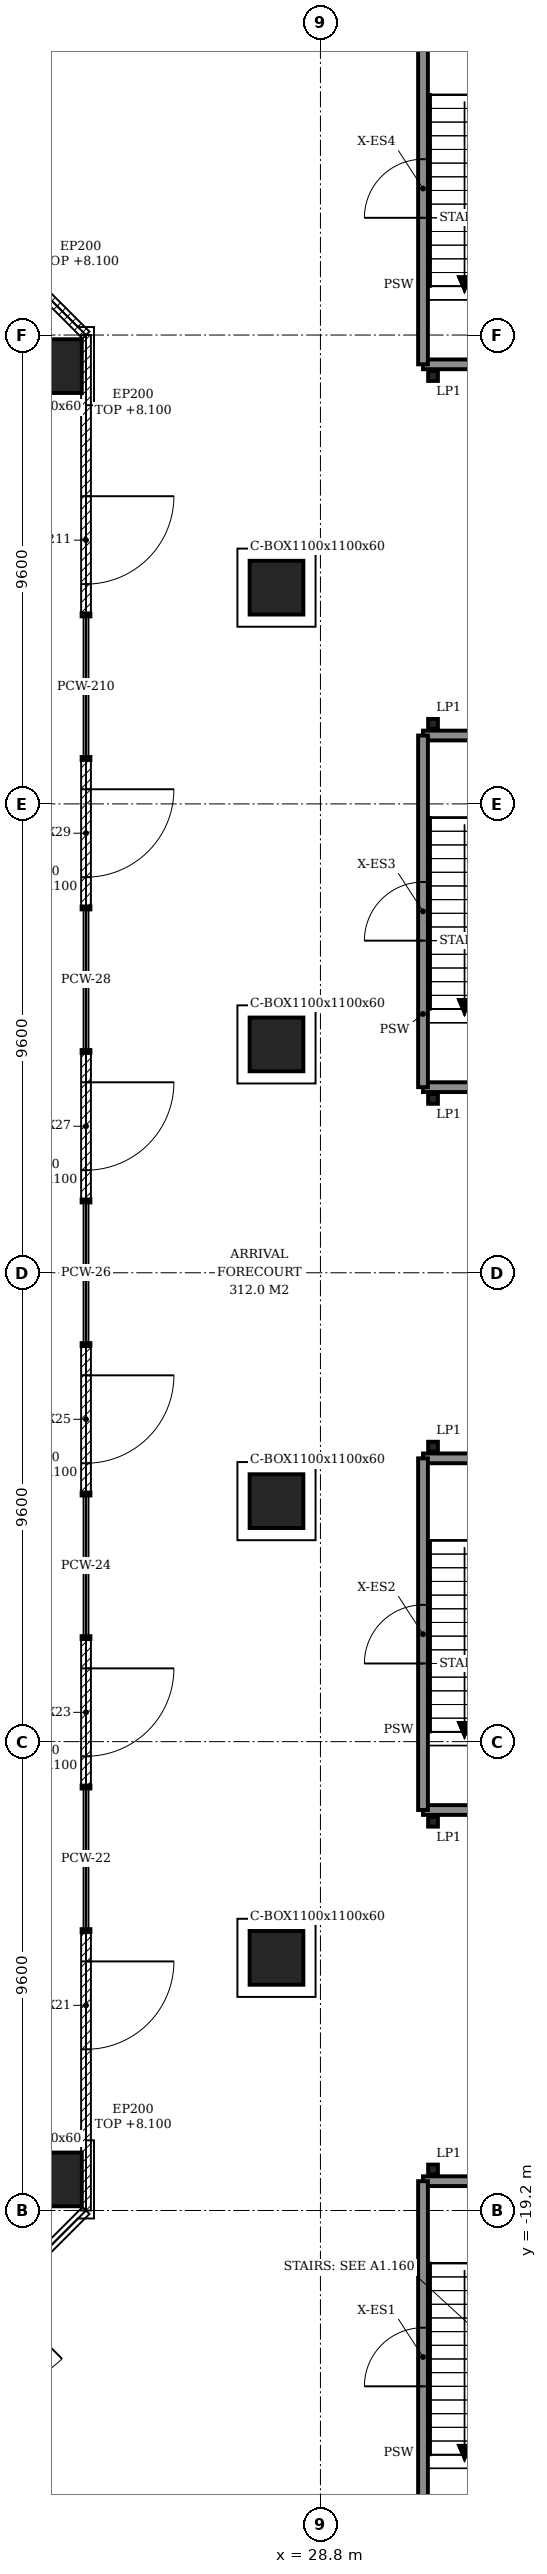
"""IFC4 building model, lengths in metres.
Left out: names, types, materials, properties, quantities, classifications, styles, units other than length and angle.
Written with IfcOpenShell. Run it as: python <this file> out.ifc"""

import sys

from ifc_helpers import new_model, si_unit, direction, frame, frame_2d, origin, origin_2d, place, context, subcontext, project, spatial, rectangle, hollow_rectangle, i_section, extrude, element, fill, save


model = new_model("IFC4")
c1 = context("Model", 3, precision=1e-05, world=origin(), true_north=direction((0.0, 1.0)))
c2 = subcontext(c1, "Body", "Model", "MODEL_VIEW")
j1 = project(units=[si_unit("LENGTHUNIT", "METRE"), si_unit("PLANEANGLEUNIT", "RADIAN")], contexts=[c1])
p1 = place(None, origin())
s1 = spatial("IfcSite", under=j1, at=p1, CompositionType="ELEMENT")
p2 = place(p1, origin())
s2 = spatial("IfcBuilding", under=s1, at=p2, CompositionType="ELEMENT")
p3 = place(p2, origin())
s3 = spatial("IfcBuildingStorey", under=s2, at=p3, CompositionType="ELEMENT", Elevation=0.0)
for number, where, z_axis, x_axis in (
    (1, (31.105, -18.36, -0.25), (0.0, 0.0, 1.0), (1.0, 0.0, 0.0)),
    (2, (31.105, -3.56, -0.25), (0.0, 0.0, 1.0), (1.0, 0.0, 0.0)),
    (3, (31.105, -11.24, -0.25), (0.0, 0.0, 1.0), (1.0, 0.0, 0.0)),
    (4, (31.105, 11.24, -0.25), (0.0, 0.0, 1.0), (1.0, 0.0, 0.0)),
    (5, (31.105, 3.56, -0.25), (0.0, 0.0, 1.0), (1.0, 0.0, 0.0)),
    (6, (31.105, 18.36, -0.25), (0.0, 0.0, 1.0), (1.0, 0.0, 0.0)),
):
    element("IfcColumn", number, at=place(p3, frame(where, z_axis=z_axis, x_axis=x_axis)), inside=s3, PredefinedType="COLUMN", context=c2, shape_type="SweptSolid", body=[
        extrude(i_section(OverallWidth=0.2, OverallDepth=0.2, WebThickness=0.009, FlangeThickness=0.015, FilletRadius=0.018, at=origin_2d()), origin(), (0.0, 0.0, 1.0), 9.25),
    ])
for number, where, z_axis, x_axis in (
    (7, (23.364, -18.564, -0.25), (0.0, 0.0, 1.0), (1.0, 0.0, 0.0)),
    (8, (27.9, -14.027, -0.25), (0.0, 0.0, 1.0), (1.0, 0.0, 0.0)),
    (9, (27.9, -4.676, -0.25), (0.0, 0.0, 1.0), (1.0, 0.0, 0.0)),
    (10, (27.9, 4.676, -0.25), (0.0, 0.0, 1.0), (1.0, 0.0, 0.0)),
    (11, (27.9, 14.027, -0.25), (0.0, 0.0, 1.0), (1.0, 0.0, 0.0)),
    (12, (23.364, 18.564, -0.25), (0.0, 0.0, 1.0), (1.0, 0.0, 0.0)),
):
    element("IfcColumn", number, at=place(p3, frame(where, z_axis=z_axis, x_axis=x_axis)), inside=s3, PredefinedType="COLUMN", context=c2, shape_type="SweptSolid", body=[
        extrude(hollow_rectangle(XDim=1.1, YDim=1.1, WallThickness=0.06, at=origin_2d()), origin(), (0.0, 0.0, 1.0), 9.05),
    ])
p4 = place(p3, frame((24.0, -19.2, 0.0), z_axis=(0.0, 0.0, 1.0), x_axis=(-0.707106781187, -0.707106781187, 0.0)))
e13 = element("IfcWall", 13, at=p4, inside=s3, PredefinedType="SOLIDWALL", context=c2, shape_type="SweptSolid", body=[
    extrude(rectangle(XDim=6.788, YDim=0.2, at=frame_2d((3.394, 0.0))), origin(), (0.0, 0.0, 1.0), 8.1),
])
p5 = place(p4, frame((2.494, 0.0, 0.0)))
e14 = element("IfcOpeningElement", 14, at=p5, cuts=e13, PredefinedType="OPENING", context=c2, shape_type="SweptSolid", body=[
    extrude(rectangle(XDim=1.8, YDim=2.1, at=frame_2d((0.9, 1.05))), frame((0.0, 0.11, 0.0), z_axis=(0.0, -1.0, 0.0), x_axis=(1.0, 0.0, 0.0)), (0.0, 0.0, 1.0), 0.22),
])
p6 = place(p3, frame((24.0, -13.5, 0.0), z_axis=(0.0, 0.0, 1.0), x_axis=(0.0, -1.0, 0.0)))
e15 = element("IfcWall", 15, at=p6, inside=s3, PredefinedType="SOLIDWALL", context=c2, shape_type="SweptSolid", body=[
    extrude(rectangle(XDim=5.7, YDim=0.2, at=frame_2d((2.85, 0.0))), origin(), (0.0, 0.0, 1.0), 8.1),
])
p7 = place(p6, frame((0.6, 0.0, 0.0)))
e16 = element("IfcOpeningElement", 16, at=p7, cuts=e15, PredefinedType="OPENING", context=c2, shape_type="SweptSolid", body=[
    extrude(rectangle(XDim=1.8, YDim=2.1, at=frame_2d((0.9, 1.05))), frame((0.0, 0.11, 0.0), z_axis=(0.0, -1.0, 0.0), x_axis=(1.0, 0.0, 0.0)), (0.0, 0.0, 1.0), 0.22),
])
p8 = place(p3, frame((24.0, -7.5, 0.0), z_axis=(0.0, 0.0, 1.0), x_axis=(0.0, -1.0, 0.0)))
e17 = element("IfcWall", 17, at=p8, inside=s3, PredefinedType="SOLIDWALL", context=c2, shape_type="SweptSolid", body=[
    extrude(rectangle(XDim=3.0, YDim=0.2, at=frame_2d((1.5, 0.0))), origin(), (0.0, 0.0, 1.0), 8.1),
])
p9 = place(p8, frame((0.6, 0.0, 0.0)))
e18 = element("IfcOpeningElement", 18, at=p9, cuts=e17, PredefinedType="OPENING", context=c2, shape_type="SweptSolid", body=[
    extrude(rectangle(XDim=1.8, YDim=2.1, at=frame_2d((0.9, 1.05))), frame((0.0, 0.11, 0.0), z_axis=(0.0, -1.0, 0.0), x_axis=(1.0, 0.0, 0.0)), (0.0, 0.0, 1.0), 0.22),
])
p10 = place(p3, frame((24.0, -1.5, 0.0), z_axis=(0.0, 0.0, 1.0), x_axis=(0.0, -1.0, 0.0)))
e19 = element("IfcWall", 19, at=p10, inside=s3, PredefinedType="SOLIDWALL", context=c2, shape_type="SweptSolid", body=[
    extrude(rectangle(XDim=3.0, YDim=0.2, at=frame_2d((1.5, 0.0))), origin(), (0.0, 0.0, 1.0), 8.1),
])
p11 = place(p10, frame((0.6, 0.0, 0.0)))
e20 = element("IfcOpeningElement", 20, at=p11, cuts=e19, PredefinedType="OPENING", context=c2, shape_type="SweptSolid", body=[
    extrude(rectangle(XDim=1.8, YDim=2.1, at=frame_2d((0.9, 1.05))), frame((0.0, 0.11, 0.0), z_axis=(0.0, -1.0, 0.0), x_axis=(1.0, 0.0, 0.0)), (0.0, 0.0, 1.0), 0.22),
])
p12 = place(p3, frame((24.0, 4.5, 0.0), z_axis=(0.0, 0.0, 1.0), x_axis=(0.0, -1.0, 0.0)))
e21 = element("IfcWall", 21, at=p12, inside=s3, PredefinedType="SOLIDWALL", context=c2, shape_type="SweptSolid", body=[
    extrude(rectangle(XDim=3.0, YDim=0.2, at=frame_2d((1.5, 0.0))), origin(), (0.0, 0.0, 1.0), 8.1),
])
p13 = place(p12, frame((0.6, 0.0, 0.0)))
e22 = element("IfcOpeningElement", 22, at=p13, cuts=e21, PredefinedType="OPENING", context=c2, shape_type="SweptSolid", body=[
    extrude(rectangle(XDim=1.8, YDim=2.1, at=frame_2d((0.9, 1.05))), frame((0.0, 0.11, 0.0), z_axis=(0.0, -1.0, 0.0), x_axis=(1.0, 0.0, 0.0)), (0.0, 0.0, 1.0), 0.22),
])
p14 = place(p3, frame((24.0, 10.5, 0.0), z_axis=(0.0, 0.0, 1.0), x_axis=(0.0, -1.0, 0.0)))
e23 = element("IfcWall", 23, at=p14, inside=s3, PredefinedType="SOLIDWALL", context=c2, shape_type="SweptSolid", body=[
    extrude(rectangle(XDim=3.0, YDim=0.2, at=frame_2d((1.5, 0.0))), origin(), (0.0, 0.0, 1.0), 8.1),
])
p15 = place(p14, frame((0.6, 0.0, 0.0)))
e24 = element("IfcOpeningElement", 24, at=p15, cuts=e23, PredefinedType="OPENING", context=c2, shape_type="SweptSolid", body=[
    extrude(rectangle(XDim=1.8, YDim=2.1, at=frame_2d((0.9, 1.05))), frame((0.0, 0.11, 0.0), z_axis=(0.0, -1.0, 0.0), x_axis=(1.0, 0.0, 0.0)), (0.0, 0.0, 1.0), 0.22),
])
p16 = place(p3, frame((24.0, 19.2, 0.0), z_axis=(0.0, 0.0, 1.0), x_axis=(0.0, -1.0, 0.0)))
e25 = element("IfcWall", 25, at=p16, inside=s3, PredefinedType="SOLIDWALL", context=c2, shape_type="SweptSolid", body=[
    extrude(rectangle(XDim=5.7, YDim=0.2, at=frame_2d((2.85, 0.0))), origin(), (0.0, 0.0, 1.0), 8.1),
])
p17 = place(p16, frame((3.3, 0.0, 0.0)))
e26 = element("IfcOpeningElement", 26, at=p17, cuts=e25, PredefinedType="OPENING", context=c2, shape_type="SweptSolid", body=[
    extrude(rectangle(XDim=1.8, YDim=2.1, at=frame_2d((0.9, 1.05))), frame((0.0, 0.11, 0.0), z_axis=(0.0, -1.0, 0.0), x_axis=(1.0, 0.0, 0.0)), (0.0, 0.0, 1.0), 0.22),
])
p18 = place(p3, frame((19.2, 24.0, 0.0), z_axis=(0.0, 0.0, 1.0), x_axis=(0.707106781187, -0.707106781187, 0.0)))
e27 = element("IfcWall", 27, at=p18, inside=s3, PredefinedType="SOLIDWALL", context=c2, shape_type="SweptSolid", body=[
    extrude(rectangle(XDim=6.788, YDim=0.2, at=frame_2d((3.394, 0.0))), origin(), (0.0, 0.0, 1.0), 8.1),
])
p19 = place(p18, frame((2.494, 0.0, 0.0)))
e28 = element("IfcOpeningElement", 28, at=p19, cuts=e27, PredefinedType="OPENING", context=c2, shape_type="SweptSolid", body=[
    extrude(rectangle(XDim=1.8, YDim=2.1, at=frame_2d((0.9, 1.05))), frame((0.0, 0.11, 0.0), z_axis=(0.0, -1.0, 0.0), x_axis=(1.0, 0.0, 0.0)), (0.0, 0.0, 1.0), 0.22),
])
p20 = place(p3, frame((30.9, -25.8, 0.0), z_axis=(0.0, 0.0, 1.0), x_axis=(0.0, 1.0, 0.0)))
e29 = element("IfcWall", 29, at=p20, inside=s3, PredefinedType="SOLIDWALL", context=c2, shape_type="SweptSolid", body=[
    extrude(rectangle(XDim=7.2, YDim=0.2, at=frame_2d((3.6, 0.0))), origin(), (0.0, 0.0, 1.0), 8.8),
])
p21 = place(p20, frame((3.0, 0.0, 0.0)))
e30 = element("IfcOpeningElement", 30, at=p21, cuts=e29, PredefinedType="OPENING", context=c2, shape_type="SweptSolid", body=[
    extrude(rectangle(XDim=1.2, YDim=2.1, at=frame_2d((0.6, 1.05))), frame((0.0, 0.11, 0.0), z_axis=(0.0, -1.0, 0.0), x_axis=(1.0, 0.0, 0.0)), (0.0, 0.0, 1.0), 0.22),
])
p22 = place(p3, frame((30.9, -18.6, 0.0), z_axis=(0.0, 0.0, 1.0), x_axis=(1.0, 0.0, 0.0)))
e31 = element("IfcWall", 31, at=p22, inside=s3, PredefinedType="SOLIDWALL", context=c2, shape_type="SweptSolid", body=[
    extrude(rectangle(XDim=3.35, YDim=0.2, at=frame_2d((1.675, 0.0))), origin(), (0.0, 0.0, 1.0), 8.8),
])
p23 = place(p3, frame((30.9, -11.0, 0.0), z_axis=(0.0, 0.0, 1.0), x_axis=(0.0, 1.0, 0.0)))
e32 = element("IfcWall", 32, at=p23, inside=s3, PredefinedType="SOLIDWALL", context=c2, shape_type="SweptSolid", body=[
    extrude(rectangle(XDim=7.2, YDim=0.2, at=frame_2d((3.6, 0.0))), origin(), (0.0, 0.0, 1.0), 8.8),
])
p24 = place(p23, frame((3.0, 0.0, 0.0)))
e33 = element("IfcOpeningElement", 33, at=p24, cuts=e32, PredefinedType="OPENING", context=c2, shape_type="SweptSolid", body=[
    extrude(rectangle(XDim=1.2, YDim=2.1, at=frame_2d((0.6, 1.05))), frame((0.0, 0.11, 0.0), z_axis=(0.0, -1.0, 0.0), x_axis=(1.0, 0.0, 0.0)), (0.0, 0.0, 1.0), 0.22),
])
for number, where, z_axis, x_axis in (
    (34, (30.9, -3.8, 0.0), (0.0, 0.0, 1.0), (1.0, 0.0, 0.0)),
    (35, (34.25, -11.0, 0.0), (0.0, 0.0, 1.0), (-1.0, 0.0, 0.0)),
):
    element("IfcWall", number, at=place(p3, frame(where, z_axis=z_axis, x_axis=x_axis)), inside=s3, PredefinedType="SOLIDWALL", context=c2, shape_type="SweptSolid", body=[
        extrude(rectangle(XDim=3.35, YDim=0.2, at=frame_2d((1.675, 0.0))), origin(), (0.0, 0.0, 1.0), 8.8),
    ])
p25 = place(p3, frame((30.9, 3.8, 0.0), z_axis=(0.0, 0.0, 1.0), x_axis=(0.0, 1.0, 0.0)))
e36 = element("IfcWall", 36, at=p25, inside=s3, PredefinedType="SOLIDWALL", context=c2, shape_type="SweptSolid", body=[
    extrude(rectangle(XDim=7.2, YDim=0.2, at=frame_2d((3.6, 0.0))), origin(), (0.0, 0.0, 1.0), 8.8),
])
p26 = place(p25, frame((3.0, 0.0, 0.0)))
e37 = element("IfcOpeningElement", 37, at=p26, cuts=e36, PredefinedType="OPENING", context=c2, shape_type="SweptSolid", body=[
    extrude(rectangle(XDim=1.2, YDim=2.1, at=frame_2d((0.6, 1.05))), frame((0.0, 0.11, 0.0), z_axis=(0.0, -1.0, 0.0), x_axis=(1.0, 0.0, 0.0)), (0.0, 0.0, 1.0), 0.22),
])
for number, where, z_axis, x_axis in (
    (38, (30.9, 11.0, 0.0), (0.0, 0.0, 1.0), (1.0, 0.0, 0.0)),
    (39, (34.25, 3.8, 0.0), (0.0, 0.0, 1.0), (-1.0, 0.0, 0.0)),
):
    element("IfcWall", number, at=place(p3, frame(where, z_axis=z_axis, x_axis=x_axis)), inside=s3, PredefinedType="SOLIDWALL", context=c2, shape_type="SweptSolid", body=[
        extrude(rectangle(XDim=3.35, YDim=0.2, at=frame_2d((1.675, 0.0))), origin(), (0.0, 0.0, 1.0), 8.8),
    ])
p27 = place(p3, frame((30.9, 18.6, 0.0), z_axis=(0.0, 0.0, 1.0), x_axis=(0.0, 1.0, 0.0)))
e40 = element("IfcWall", 40, at=p27, inside=s3, PredefinedType="SOLIDWALL", context=c2, shape_type="SweptSolid", body=[
    extrude(rectangle(XDim=7.2, YDim=0.2, at=frame_2d((3.6, 0.0))), origin(), (0.0, 0.0, 1.0), 8.8),
])
p28 = place(p27, frame((3.0, 0.0, 0.0)))
e41 = element("IfcOpeningElement", 41, at=p28, cuts=e40, PredefinedType="OPENING", context=c2, shape_type="SweptSolid", body=[
    extrude(rectangle(XDim=1.2, YDim=2.1, at=frame_2d((0.6, 1.05))), frame((0.0, 0.11, 0.0), z_axis=(0.0, -1.0, 0.0), x_axis=(1.0, 0.0, 0.0)), (0.0, 0.0, 1.0), 0.22),
])
p29 = place(p3, frame((34.25, 18.6, 0.0), z_axis=(0.0, 0.0, 1.0), x_axis=(-1.0, 0.0, 0.0)))
e42 = element("IfcWall", 42, at=p29, inside=s3, PredefinedType="SOLIDWALL", context=c2, shape_type="SweptSolid", body=[
    extrude(rectangle(XDim=3.35, YDim=0.2, at=frame_2d((1.675, 0.0))), origin(), (0.0, 0.0, 1.0), 8.8),
])
p30 = place(p7, origin())
e43 = element("IfcDoor", 43, at=p30, inside=s3, OperationType="SINGLE_SWING_LEFT", PredefinedType="DOOR", context=c2, shape_type="SweptSolid", body=[
    extrude(rectangle(XDim=1.8, YDim=2.1, at=frame_2d((0.9, 1.05))), frame((0.0, 0.025, 0.0), z_axis=(0.0, -1.0, 0.0), x_axis=(1.0, 0.0, 0.0)), (0.0, 0.0, 1.0), 0.05),
])
fill(e16, e43)
p31 = place(p9, origin())
e44 = element("IfcDoor", 44, at=p31, inside=s3, OperationType="SINGLE_SWING_LEFT", PredefinedType="DOOR", context=c2, shape_type="SweptSolid", body=[
    extrude(rectangle(XDim=1.8, YDim=2.1, at=frame_2d((0.9, 1.05))), frame((0.0, 0.025, 0.0), z_axis=(0.0, -1.0, 0.0), x_axis=(1.0, 0.0, 0.0)), (0.0, 0.0, 1.0), 0.05),
])
fill(e18, e44)
p32 = place(p11, origin())
e45 = element("IfcDoor", 45, at=p32, inside=s3, OperationType="SINGLE_SWING_LEFT", PredefinedType="DOOR", context=c2, shape_type="SweptSolid", body=[
    extrude(rectangle(XDim=1.8, YDim=2.1, at=frame_2d((0.9, 1.05))), frame((0.0, 0.025, 0.0), z_axis=(0.0, -1.0, 0.0), x_axis=(1.0, 0.0, 0.0)), (0.0, 0.0, 1.0), 0.05),
])
fill(e20, e45)
p33 = place(p13, origin())
e46 = element("IfcDoor", 46, at=p33, inside=s3, OperationType="SINGLE_SWING_LEFT", PredefinedType="DOOR", context=c2, shape_type="SweptSolid", body=[
    extrude(rectangle(XDim=1.8, YDim=2.1, at=frame_2d((0.9, 1.05))), frame((0.0, 0.025, 0.0), z_axis=(0.0, -1.0, 0.0), x_axis=(1.0, 0.0, 0.0)), (0.0, 0.0, 1.0), 0.05),
])
fill(e22, e46)
p34 = place(p15, origin())
e47 = element("IfcDoor", 47, at=p34, inside=s3, OperationType="SINGLE_SWING_LEFT", PredefinedType="DOOR", context=c2, shape_type="SweptSolid", body=[
    extrude(rectangle(XDim=1.8, YDim=2.1, at=frame_2d((0.9, 1.05))), frame((0.0, 0.025, 0.0), z_axis=(0.0, -1.0, 0.0), x_axis=(1.0, 0.0, 0.0)), (0.0, 0.0, 1.0), 0.05),
])
fill(e24, e47)
p35 = place(p17, origin())
e48 = element("IfcDoor", 48, at=p35, inside=s3, OperationType="SINGLE_SWING_LEFT", PredefinedType="DOOR", context=c2, shape_type="SweptSolid", body=[
    extrude(rectangle(XDim=1.8, YDim=2.1, at=frame_2d((0.9, 1.05))), frame((0.0, 0.025, 0.0), z_axis=(0.0, -1.0, 0.0), x_axis=(1.0, 0.0, 0.0)), (0.0, 0.0, 1.0), 0.05),
])
fill(e26, e48)
p36 = place(p21, origin())
e49 = element("IfcDoor", 49, at=p36, inside=s3, OperationType="SINGLE_SWING_LEFT", PredefinedType="DOOR", context=c2, shape_type="SweptSolid", body=[
    extrude(rectangle(XDim=1.2, YDim=2.1, at=frame_2d((0.6, 1.05))), frame((0.0, 0.025, 0.0), z_axis=(0.0, -1.0, 0.0), x_axis=(1.0, 0.0, 0.0)), (0.0, 0.0, 1.0), 0.05),
])
fill(e30, e49)
p37 = place(p24, origin())
e50 = element("IfcDoor", 50, at=p37, inside=s3, OperationType="SINGLE_SWING_LEFT", PredefinedType="DOOR", context=c2, shape_type="SweptSolid", body=[
    extrude(rectangle(XDim=1.2, YDim=2.1, at=frame_2d((0.6, 1.05))), frame((0.0, 0.025, 0.0), z_axis=(0.0, -1.0, 0.0), x_axis=(1.0, 0.0, 0.0)), (0.0, 0.0, 1.0), 0.05),
])
fill(e33, e50)
p38 = place(p26, origin())
e51 = element("IfcDoor", 51, at=p38, inside=s3, OperationType="SINGLE_SWING_LEFT", PredefinedType="DOOR", context=c2, shape_type="SweptSolid", body=[
    extrude(rectangle(XDim=1.2, YDim=2.1, at=frame_2d((0.6, 1.05))), frame((0.0, 0.025, 0.0), z_axis=(0.0, -1.0, 0.0), x_axis=(1.0, 0.0, 0.0)), (0.0, 0.0, 1.0), 0.05),
])
fill(e37, e51)
p39 = place(p28, origin())
e52 = element("IfcDoor", 52, at=p39, inside=s3, OperationType="SINGLE_SWING_LEFT", PredefinedType="DOOR", context=c2, shape_type="SweptSolid", body=[
    extrude(rectangle(XDim=1.2, YDim=2.1, at=frame_2d((0.6, 1.05))), frame((0.0, 0.025, 0.0), z_axis=(0.0, -1.0, 0.0), x_axis=(1.0, 0.0, 0.0)), (0.0, 0.0, 1.0), 0.05),
])
fill(e41, e52)
save(model, sys.argv[1])
